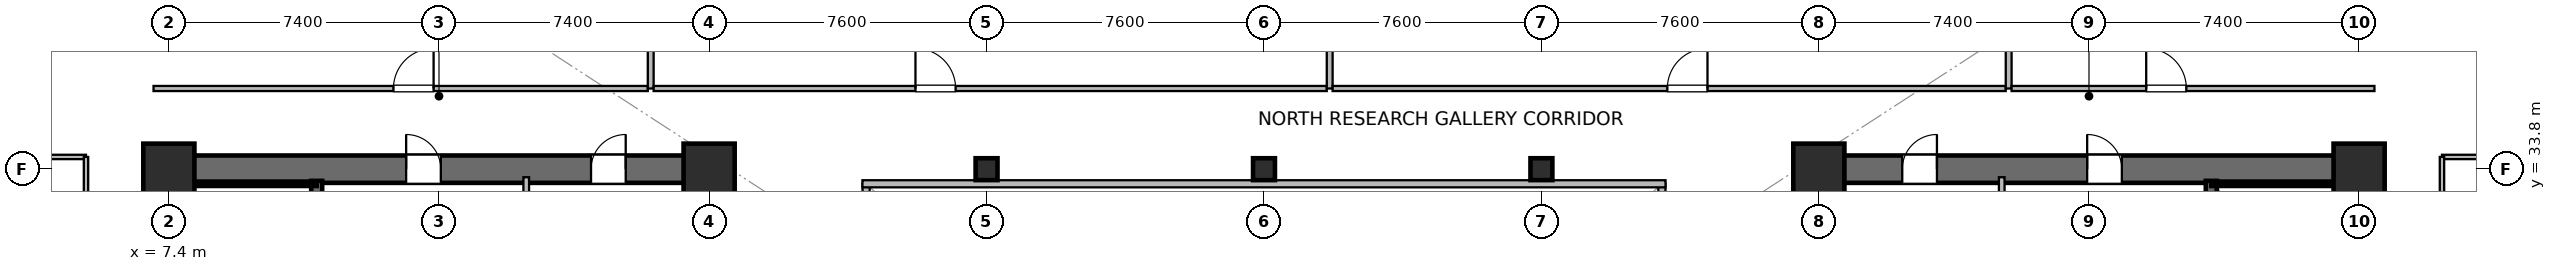
"""IFC4 building model, lengths in metres.
Left out: names, types, materials, properties, quantities, classifications, styles, units other than length and angle.
Written with IfcOpenShell. Run it as: python <this file> out.ifc"""

import sys

from ifc_helpers import new_model, si_unit, direction, frame, frame_2d, origin, origin_2d, place, context, subcontext, project, spatial, rectangle, hollow_rectangle, extrude, source, transform, mapped, element, fill, save


model = new_model("IFC4")
c1 = context("Model", 3, precision=1e-05, world=origin(), true_north=direction((0.0, 1.0)))
c2 = subcontext(c1, "Body", "Model", "MODEL_VIEW")
j1 = project(units=[si_unit("LENGTHUNIT", "METRE"), si_unit("PLANEANGLEUNIT", "RADIAN")], contexts=[c1])
p1 = place(None, origin())
s1 = spatial("IfcSite", under=j1, at=p1, CompositionType="ELEMENT")
p2 = place(p1, origin())
s2 = spatial("IfcBuilding", under=s1, at=p2, CompositionType="ELEMENT")
p3 = place(p2, frame((0.0, 0.0, 25.2)))
s3 = spatial("IfcBuildingStorey", under=s2, at=p3, CompositionType="ELEMENT", Elevation=25.2)
p4 = place(p3, frame((7.025, 33.8, 0.0), z_axis=(0.0, 0.0, 1.0), x_axis=(1.0, 0.0, 0.0)))
e1 = element("IfcWall", 1, at=p4, inside=s3, PredefinedType="SHEAR", context=c2, shape_type="SweptSolid", body=[
    extrude(rectangle(XDim=15.55, YDim=0.75, at=frame_2d((7.775, 0.0))), origin(), (0.0, 0.0, 1.0), 3.78),
])
p5 = place(p4, frame((6.875, 0.0, 0.0)))
e2 = element("IfcOpeningElement", 2, at=p5, cuts=e1, PredefinedType="OPENING", context=c2, shape_type="SweptSolid", body=[
    extrude(rectangle(XDim=0.95, YDim=2.15, at=frame_2d((0.475, 1.075))), frame((0.0, 0.385, 0.0), z_axis=(0.0, -1.0, 0.0), x_axis=(1.0, 0.0, 0.0)), (0.0, 0.0, 1.0), 0.77),
])
p6 = place(p4, frame((11.94, 0.0, 0.0)))
e3 = element("IfcOpeningElement", 3, at=p6, cuts=e1, PredefinedType="OPENING", context=c2, shape_type="SweptSolid", body=[
    extrude(rectangle(XDim=0.95, YDim=2.15, at=frame_2d((0.475, 1.075))), frame((0.0, 0.385, 0.0), z_axis=(0.0, -1.0, 0.0), x_axis=(1.0, 0.0, 0.0)), (0.0, 0.0, 1.0), 0.77),
])
p7 = place(p3, frame((7.4, 15.175, 0.0), z_axis=(0.0, 0.0, 1.0), x_axis=(0.0, 1.0, 0.0)))
e4 = element("IfcWall", 4, at=p7, inside=s3, PredefinedType="SHEAR", context=c2, shape_type="SweptSolid", body=[
    extrude(rectangle(XDim=18.25, YDim=0.75, at=frame_2d((9.125, 0.0))), origin(), (0.0, 0.0, 1.0), 3.78),
])
p8 = place(p3, frame((22.2, 15.175, 0.0), z_axis=(0.0, 0.0, 1.0), x_axis=(0.0, 1.0, 0.0)))
e5 = element("IfcWall", 5, at=p8, inside=s3, PredefinedType="SHEAR", context=c2, shape_type="SweptSolid", body=[
    extrude(rectangle(XDim=18.25, YDim=0.75, at=frame_2d((9.125, 0.0))), origin(), (0.0, 0.0, 1.0), 3.78),
])
p9 = place(p8, frame((3.375, 0.0, 0.0)))
e6 = element("IfcOpeningElement", 6, at=p9, cuts=e5, PredefinedType="OPENING", context=c2, shape_type="SweptSolid", body=[
    extrude(rectangle(XDim=1.42, YDim=2.2, at=frame_2d((0.71, 1.1))), frame((0.0, 0.385, 0.0), z_axis=(0.0, -1.0, 0.0), x_axis=(1.0, 0.0, 0.0)), (0.0, 0.0, 1.0), 0.77),
])
p10 = place(p3, frame((11.45, 24.85, 0.0), z_axis=(0.0, 0.0, 1.0), x_axis=(0.0, 1.0, 0.0)))
e7 = element("IfcWall", 7, at=p10, inside=s3, PredefinedType="SHEAR", context=c2, shape_type="SweptSolid", body=[
    extrude(rectangle(XDim=8.63, YDim=0.3, at=frame_2d((4.315, 0.0))), origin(), (0.0, 0.0, 1.0), 3.78),
])
p11 = place(p10, frame((0.42, 0.0, 0.0)))
e8 = element("IfcOpeningElement", 8, at=p11, cuts=e7, PredefinedType="OPENING", context=c2, shape_type="SweptSolid", body=[
    extrude(rectangle(XDim=1.1, YDim=2.15, at=frame_2d((0.55, 1.075))), frame((0.0, 0.16, 0.0), z_axis=(0.0, -1.0, 0.0), x_axis=(1.0, 0.0, 0.0)), (0.0, 0.0, 1.0), 0.32),
])
p12 = place(p3, frame((7.73, 33.4, 0.0), z_axis=(0.0, 0.0, 1.0), x_axis=(1.0, 0.0, 0.0)))
e9 = element("IfcWall", 9, at=p12, inside=s3, PredefinedType="SOLIDWALL", context=c2, shape_type="SweptSolid", body=[
    extrude(rectangle(XDim=3.72, YDim=0.12, at=frame_2d((1.86, 0.0))), origin(), (0.0, 0.0, 1.0), 3.78),
])
p13 = place(p3, frame((52.225, 33.8, 0.0), z_axis=(0.0, 0.0, 1.0), x_axis=(1.0, 0.0, 0.0)))
e10 = element("IfcWall", 10, at=p13, inside=s3, PredefinedType="SHEAR", context=c2, shape_type="SweptSolid", body=[
    extrude(rectangle(XDim=15.55, YDim=0.75, at=frame_2d((7.775, 0.0))), origin(), (0.0, 0.0, 1.0), 3.78),
])
p14 = place(p13, frame((7.725, 0.0, 0.0)))
e11 = element("IfcOpeningElement", 11, at=p14, cuts=e10, PredefinedType="OPENING", context=c2, shape_type="SweptSolid", body=[
    extrude(rectangle(XDim=0.95, YDim=2.15, at=frame_2d((0.475, 1.075))), frame((0.0, 0.385, 0.0), z_axis=(0.0, -1.0, 0.0), x_axis=(1.0, 0.0, 0.0)), (0.0, 0.0, 1.0), 0.77),
])
p15 = place(p13, frame((2.66, 0.0, 0.0)))
e12 = element("IfcOpeningElement", 12, at=p15, cuts=e10, PredefinedType="OPENING", context=c2, shape_type="SweptSolid", body=[
    extrude(rectangle(XDim=0.95, YDim=2.15, at=frame_2d((0.475, 1.075))), frame((0.0, 0.385, 0.0), z_axis=(0.0, -1.0, 0.0), x_axis=(1.0, 0.0, 0.0)), (0.0, 0.0, 1.0), 0.77),
])
p16 = place(p3, frame((52.6, 15.175, 0.0), z_axis=(0.0, 0.0, 1.0), x_axis=(0.0, 1.0, 0.0)))
e13 = element("IfcWall", 13, at=p16, inside=s3, PredefinedType="SHEAR", context=c2, shape_type="SweptSolid", body=[
    extrude(rectangle(XDim=18.25, YDim=0.75, at=frame_2d((9.125, 0.0))), origin(), (0.0, 0.0, 1.0), 3.78),
])
p17 = place(p16, frame((3.375, 0.0, 0.0)))
e14 = element("IfcOpeningElement", 14, at=p17, cuts=e13, PredefinedType="OPENING", context=c2, shape_type="SweptSolid", body=[
    extrude(rectangle(XDim=1.42, YDim=2.2, at=frame_2d((0.71, 1.1))), frame((0.0, 0.385, 0.0), z_axis=(0.0, -1.0, 0.0), x_axis=(1.0, 0.0, 0.0)), (0.0, 0.0, 1.0), 0.77),
])
p18 = place(p3, frame((67.4, 15.175, 0.0), z_axis=(0.0, 0.0, 1.0), x_axis=(0.0, 1.0, 0.0)))
e15 = element("IfcWall", 15, at=p18, inside=s3, PredefinedType="SHEAR", context=c2, shape_type="SweptSolid", body=[
    extrude(rectangle(XDim=18.25, YDim=0.75, at=frame_2d((9.125, 0.0))), origin(), (0.0, 0.0, 1.0), 3.78),
])
p19 = place(p3, frame((63.35, 24.85, 0.0), z_axis=(0.0, 0.0, 1.0), x_axis=(0.0, 1.0, 0.0)))
e16 = element("IfcWall", 16, at=p19, inside=s3, PredefinedType="SHEAR", context=c2, shape_type="SweptSolid", body=[
    extrude(rectangle(XDim=8.63, YDim=0.3, at=frame_2d((4.315, 0.0))), origin(), (0.0, 0.0, 1.0), 3.78),
])
p20 = place(p19, frame((0.42, 0.0, 0.0)))
e17 = element("IfcOpeningElement", 17, at=p20, cuts=e16, PredefinedType="OPENING", context=c2, shape_type="SweptSolid", body=[
    extrude(rectangle(XDim=1.1, YDim=2.15, at=frame_2d((0.55, 1.075))), frame((0.0, 0.16, 0.0), z_axis=(0.0, -1.0, 0.0), x_axis=(1.0, 0.0, 0.0)), (0.0, 0.0, 1.0), 0.32),
])
p21 = place(p3, frame((63.35, 33.4, 0.0), z_axis=(0.0, 0.0, 1.0), x_axis=(1.0, 0.0, 0.0)))
e18 = element("IfcWall", 18, at=p21, inside=s3, PredefinedType="SOLIDWALL", context=c2, shape_type="SweptSolid", body=[
    extrude(rectangle(XDim=3.72, YDim=0.12, at=frame_2d((1.86, 0.0))), origin(), (0.0, 0.0, 1.0), 3.78),
])
m1 = source(origin(), c2, "Body", "SweptSolid", [
    extrude(rectangle(XDim=1.4, YDim=1.4, at=origin_2d()), origin(), (0.0, 0.0, 1.0), 4.1),
])
for number, where, z_axis, x_axis in (
    (19, (7.4, 33.8, 0.0), (0.0, 0.0, 1.0), (1.0, 0.0, 0.0)),
    (20, (22.2, 33.8, 0.0), (0.0, 0.0, 1.0), (1.0, 0.0, 0.0)),
    (21, (52.6, 33.8, 0.0), (0.0, 0.0, 1.0), (1.0, 0.0, 0.0)),
    (22, (67.4, 33.8, 0.0), (0.0, 0.0, 1.0), (1.0, 0.0, 0.0)),
):
    element("IfcColumn", number, at=place(p3, frame(where, z_axis=z_axis, x_axis=x_axis)), inside=s3, PredefinedType="COLUMN", context=c2, shape_type="MappedRepresentation", body=[
        mapped(m1, transform((0.0, 0.0, 0.0), scale=1.0)),
    ])
m2 = source(origin(), c2, "Body", "SweptSolid", [
    extrude(hollow_rectangle(XDim=0.6, YDim=0.6, WallThickness=0.028, at=origin_2d()), origin(), (0.0, 0.0, 1.0), 4.1),
])
for number, where, z_axis, x_axis in (
    (23, (29.8, 33.8, 0.0), (0.0, 0.0, 1.0), (1.0, 0.0, 0.0)),
    (24, (37.4, 33.8, 0.0), (0.0, 0.0, 1.0), (1.0, 0.0, 0.0)),
    (25, (45.0, 33.8, 0.0), (0.0, 0.0, 1.0), (1.0, 0.0, 0.0)),
):
    element("IfcColumn", number, at=place(p3, frame(where, z_axis=z_axis, x_axis=x_axis)), inside=s3, PredefinedType="COLUMN", context=c2, shape_type="MappedRepresentation", body=[
        mapped(m2, transform((0.0, 0.0, 0.0), scale=1.0)),
    ])
for number, where, z_axis, x_axis in (
    (26, (17.19, 29.65, 0.0), (0.0, 0.0, 1.0), (0.0, 1.0, 0.0)),
    (27, (57.61, 29.65, 0.0), (0.0, 0.0, 1.0), (0.0, 1.0, 0.0)),
):
    element("IfcWall", number, at=place(p3, frame(where, z_axis=z_axis, x_axis=x_axis)), inside=s3, PredefinedType="PLUMBINGWALL", context=c2, shape_type="SweptSolid", body=[
        extrude(rectangle(XDim=3.93, YDim=0.155, at=frame_2d((1.965, 0.0))), origin(), (0.0, 0.0, 1.0), 3.78),
    ])
p22 = place(p3, frame((26.5, 15.2, 0.0), z_axis=(0.0, 0.0, 1.0), x_axis=(0.0, 1.0, 0.0)))
e28 = element("IfcWall", 28, at=p22, inside=s3, PredefinedType="SOLIDWALL", context=c2, shape_type="SweptSolid", body=[
    extrude(rectangle(XDim=18.2, YDim=0.195, at=frame_2d((9.1, 0.0))), origin(), (0.0, 0.0, 1.0), 3.78),
])
p23 = place(p22, frame((1.8, 0.0, 0.9)))
e29 = element("IfcOpeningElement", 29, at=p23, cuts=e28, PredefinedType="OPENING", context=c2, shape_type="SweptSolid", body=[
    extrude(rectangle(XDim=1.5, YDim=1.4, at=frame_2d((0.75, 0.7))), frame((0.0, 0.107, 0.0), z_axis=(0.0, -1.0, 0.0), x_axis=(1.0, 0.0, 0.0)), (0.0, 0.0, 1.0), 0.215),
])
p24 = place(p22, frame((13.2, 0.0, 0.9)))
e30 = element("IfcOpeningElement", 30, at=p24, cuts=e28, PredefinedType="OPENING", context=c2, shape_type="SweptSolid", body=[
    extrude(rectangle(XDim=1.5, YDim=1.4, at=frame_2d((0.75, 0.7))), frame((0.0, 0.107, 0.0), z_axis=(0.0, -1.0, 0.0), x_axis=(1.0, 0.0, 0.0)), (0.0, 0.0, 1.0), 0.215),
])
p25 = place(p3, frame((48.3, 15.2, 0.0), z_axis=(0.0, 0.0, 1.0), x_axis=(0.0, 1.0, 0.0)))
e31 = element("IfcWall", 31, at=p25, inside=s3, PredefinedType="SOLIDWALL", context=c2, shape_type="SweptSolid", body=[
    extrude(rectangle(XDim=18.2, YDim=0.195, at=frame_2d((9.1, 0.0))), origin(), (0.0, 0.0, 1.0), 3.78),
])
p26 = place(p25, frame((1.8, 0.0, 0.9)))
e32 = element("IfcOpeningElement", 32, at=p26, cuts=e31, PredefinedType="OPENING", context=c2, shape_type="SweptSolid", body=[
    extrude(rectangle(XDim=1.5, YDim=1.4, at=frame_2d((0.75, 0.7))), frame((0.0, 0.107, 0.0), z_axis=(0.0, -1.0, 0.0), x_axis=(1.0, 0.0, 0.0)), (0.0, 0.0, 1.0), 0.215),
])
p27 = place(p25, frame((13.2, 0.0, 0.9)))
e33 = element("IfcOpeningElement", 33, at=p27, cuts=e31, PredefinedType="OPENING", context=c2, shape_type="SweptSolid", body=[
    extrude(rectangle(XDim=1.5, YDim=1.4, at=frame_2d((0.75, 0.7))), frame((0.0, 0.107, 0.0), z_axis=(0.0, -1.0, 0.0), x_axis=(1.0, 0.0, 0.0)), (0.0, 0.0, 1.0), 0.215),
])
p28 = place(p3, frame((26.4, 33.4, 0.0), z_axis=(0.0, 0.0, 1.0), x_axis=(1.0, 0.0, 0.0)))
e34 = element("IfcWall", 34, at=p28, inside=s3, PredefinedType="SOLIDWALL", context=c2, shape_type="SweptSolid", body=[
    extrude(rectangle(XDim=22.0, YDim=0.195, at=frame_2d((11.0, 0.0))), origin(), (0.0, 0.0, 1.0), 3.78),
])
p29 = place(p3, frame((6.98, 36.01, 0.0), z_axis=(0.0, 0.0, 1.0), x_axis=(1.0, 0.0, 0.0)))
e35 = element("IfcWall", 35, at=p29, inside=s3, PredefinedType="PARTITIONING", context=c2, shape_type="SweptSolid", body=[
    extrude(rectangle(XDim=13.54, YDim=0.14, at=frame_2d((6.77, 0.0))), origin(), (0.0, 0.0, 1.0), 3.065),
])
p30 = place(p29, frame((6.572, 0.0, 0.0)))
e36 = element("IfcOpeningElement", 36, at=p30, cuts=e35, PredefinedType="OPENING", context=c2, shape_type="SweptSolid", body=[
    extrude(rectangle(XDim=1.1, YDim=2.18, at=frame_2d((0.55, 1.09))), frame((0.0, 0.08, 0.0), z_axis=(0.0, -1.0, 0.0), x_axis=(1.0, 0.0, 0.0)), (0.0, 0.0, 1.0), 0.16),
])
p31 = place(p3, frame((20.6, 36.01, 0.0), z_axis=(0.0, 0.0, 1.0), x_axis=(0.0, 1.0, 0.0)))
e37 = element("IfcWall", 37, at=p31, inside=s3, PredefinedType="PARTITIONING", context=c2, shape_type="SweptSolid", body=[
    extrude(rectangle(XDim=12.48, YDim=0.16, at=frame_2d((6.24, 0.0))), origin(), (0.0, 0.0, 1.0), 3.015),
])
p32 = place(p3, frame((20.68, 36.01, 0.0), z_axis=(0.0, 0.0, 1.0), x_axis=(1.0, 0.0, 0.0)))
e38 = element("IfcWall", 38, at=p32, inside=s3, PredefinedType="PARTITIONING", context=c2, shape_type="SweptSolid", body=[
    extrude(rectangle(XDim=18.44, YDim=0.14, at=frame_2d((9.22, 0.0))), origin(), (0.0, 0.0, 1.0), 3.065),
])
p33 = place(p32, frame((7.172, 0.0, 0.0)))
e39 = element("IfcOpeningElement", 39, at=p33, cuts=e38, PredefinedType="OPENING", context=c2, shape_type="SweptSolid", body=[
    extrude(rectangle(XDim=1.1, YDim=2.18, at=frame_2d((0.55, 1.09))), frame((0.0, 0.08, 0.0), z_axis=(0.0, -1.0, 0.0), x_axis=(1.0, 0.0, 0.0)), (0.0, 0.0, 1.0), 0.16),
])
p34 = place(p3, frame((39.2, 36.01, 0.0), z_axis=(0.0, 0.0, 1.0), x_axis=(0.0, 1.0, 0.0)))
e40 = element("IfcWall", 40, at=p34, inside=s3, PredefinedType="PARTITIONING", context=c2, shape_type="SweptSolid", body=[
    extrude(rectangle(XDim=11.28, YDim=0.16, at=frame_2d((5.64, 0.0))), origin(), (0.0, 0.0, 1.0), 3.015),
])
p35 = place(p3, frame((39.28, 36.01, 0.0), z_axis=(0.0, 0.0, 1.0), x_axis=(1.0, 0.0, 0.0)))
e41 = element("IfcWall", 41, at=p35, inside=s3, PredefinedType="PARTITIONING", context=c2, shape_type="SweptSolid", body=[
    extrude(rectangle(XDim=18.44, YDim=0.14, at=frame_2d((9.22, 0.0))), origin(), (0.0, 0.0, 1.0), 3.065),
])
p36 = place(p35, frame((9.169, 0.0, 0.0)))
e42 = element("IfcOpeningElement", 42, at=p36, cuts=e41, PredefinedType="OPENING", context=c2, shape_type="SweptSolid", body=[
    extrude(rectangle(XDim=1.1, YDim=2.18, at=frame_2d((0.55, 1.09))), frame((0.0, 0.08, 0.0), z_axis=(0.0, -1.0, 0.0), x_axis=(1.0, 0.0, 0.0)), (0.0, 0.0, 1.0), 0.16),
])
p37 = place(p3, frame((57.8, 36.01, 0.0), z_axis=(0.0, 0.0, 1.0), x_axis=(0.0, 1.0, 0.0)))
e43 = element("IfcWall", 43, at=p37, inside=s3, PredefinedType="PARTITIONING", context=c2, shape_type="SweptSolid", body=[
    extrude(rectangle(XDim=12.48, YDim=0.16, at=frame_2d((6.24, 0.0))), origin(), (0.0, 0.0, 1.0), 3.015),
])
p38 = place(p3, frame((57.88, 36.01, 0.0), z_axis=(0.0, 0.0, 1.0), x_axis=(1.0, 0.0, 0.0)))
e44 = element("IfcWall", 44, at=p38, inside=s3, PredefinedType="PARTITIONING", context=c2, shape_type="SweptSolid", body=[
    extrude(rectangle(XDim=9.94, YDim=0.14, at=frame_2d((4.97, 0.0))), origin(), (0.0, 0.0, 1.0), 3.065),
])
p39 = place(p38, frame((3.688, 0.0, 0.0)))
e45 = element("IfcOpeningElement", 45, at=p39, cuts=e44, PredefinedType="OPENING", context=c2, shape_type="SweptSolid", body=[
    extrude(rectangle(XDim=1.1, YDim=2.18, at=frame_2d((0.55, 1.09))), frame((0.0, 0.08, 0.0), z_axis=(0.0, -1.0, 0.0), x_axis=(1.0, 0.0, 0.0)), (0.0, 0.0, 1.0), 0.16),
])
p40 = place(p3, frame((0.11, 34.135, 0.0), z_axis=(0.0, 0.0, 1.0), x_axis=(1.0, 0.0, 0.0)))
e46 = element("IfcWall", 46, at=p40, inside=s3, PredefinedType="PARTITIONING", context=c2, shape_type="SweptSolid", body=[
    extrude(rectangle(XDim=5.02, YDim=0.12, at=frame_2d((2.51, 0.0))), origin(), (0.0, 0.0, 1.0), 3.78),
])
p41 = place(p3, frame((5.13, 22.46, 0.0), z_axis=(0.0, 0.0, 1.0), x_axis=(0.0, 1.0, 0.0)))
e47 = element("IfcWall", 47, at=p41, inside=s3, PredefinedType="PARTITIONING", context=c2, shape_type="SweptSolid", body=[
    extrude(rectangle(XDim=11.675, YDim=0.12, at=frame_2d((5.837, 0.0))), origin(), (0.0, 0.0, 1.0), 3.78),
])
p42 = place(p41, frame((5.387, 0.0, 0.0)))
e48 = element("IfcOpeningElement", 48, at=p42, cuts=e47, PredefinedType="OPENING", context=c2, shape_type="SweptSolid", body=[
    extrude(rectangle(XDim=0.9, YDim=2.1, at=frame_2d((0.45, 1.05))), frame((0.0, 0.07, 0.0), z_axis=(0.0, -1.0, 0.0), x_axis=(1.0, 0.0, 0.0)), (0.0, 0.0, 1.0), 0.14),
])
p43 = place(p3, frame((69.67, 34.135, 0.0), z_axis=(0.0, 0.0, 1.0), x_axis=(1.0, 0.0, 0.0)))
e49 = element("IfcWall", 49, at=p43, inside=s3, PredefinedType="PARTITIONING", context=c2, shape_type="SweptSolid", body=[
    extrude(rectangle(XDim=5.02, YDim=0.12, at=frame_2d((2.51, 0.0))), origin(), (0.0, 0.0, 1.0), 3.78),
])
p44 = place(p3, frame((69.67, 25.86, 0.0), z_axis=(0.0, 0.0, 1.0), x_axis=(0.0, 1.0, 0.0)))
e50 = element("IfcWall", 50, at=p44, inside=s3, PredefinedType="PARTITIONING", context=c2, shape_type="SweptSolid", body=[
    extrude(rectangle(XDim=8.275, YDim=0.12, at=frame_2d((4.137, 0.0))), origin(), (0.0, 0.0, 1.0), 3.78),
])
p45 = place(p44, frame((3.688, 0.0, 0.0)))
e51 = element("IfcOpeningElement", 51, at=p45, cuts=e50, PredefinedType="OPENING", context=c2, shape_type="SweptSolid", body=[
    extrude(rectangle(XDim=0.9, YDim=2.1, at=frame_2d((0.45, 1.05))), frame((0.0, 0.07, 0.0), z_axis=(0.0, -1.0, 0.0), x_axis=(1.0, 0.0, 0.0)), (0.0, 0.0, 1.0), 0.14),
])
m3 = source(origin(), c2, "Body", "SweptSolid", [
    extrude(rectangle(XDim=0.95, YDim=2.15, at=frame_2d((0.475, 1.075))), frame((0.0, 0.025, 0.0), z_axis=(0.0, -1.0, 0.0), x_axis=(1.0, 0.0, 0.0)), (0.0, 0.0, 1.0), 0.05),
])
p46 = place(p5, origin())
e52 = element("IfcDoor", 52, at=p46, inside=s3, OperationType="SINGLE_SWING_LEFT", PredefinedType="DOOR", context=c2, shape_type="MappedRepresentation", body=[
    mapped(m3, transform((0.0, 0.0, 0.0), scale=1.0)),
])
fill(e2, e52)
p47 = place(p6, origin())
e53 = element("IfcDoor", 53, at=p47, inside=s3, OperationType="SINGLE_SWING_RIGHT", PredefinedType="DOOR", context=c2, shape_type="MappedRepresentation", body=[
    mapped(m3, transform((0.0, 0.0, 0.0), scale=1.0)),
])
fill(e3, e53)
p48 = place(p14, origin())
e54 = element("IfcDoor", 54, at=p48, inside=s3, OperationType="SINGLE_SWING_LEFT", PredefinedType="DOOR", context=c2, shape_type="MappedRepresentation", body=[
    mapped(m3, transform((0.0, 0.0, 0.0), scale=1.0)),
])
fill(e11, e54)
p49 = place(p15, origin())
e55 = element("IfcDoor", 55, at=p49, inside=s3, OperationType="SINGLE_SWING_RIGHT", PredefinedType="DOOR", context=c2, shape_type="MappedRepresentation", body=[
    mapped(m3, transform((0.0, 0.0, 0.0), scale=1.0)),
])
fill(e12, e55)
m4 = source(origin(), c2, "Body", "SweptSolid", [
    extrude(rectangle(XDim=1.1, YDim=2.18, at=frame_2d((0.55, 1.09))), frame((0.0, 0.025, 0.0), z_axis=(0.0, -1.0, 0.0), x_axis=(1.0, 0.0, 0.0)), (0.0, 0.0, 1.0), 0.05),
])
p50 = place(p30, origin())
e56 = element("IfcDoor", 56, at=p50, inside=s3, OperationType="SINGLE_SWING_RIGHT", PredefinedType="DOOR", context=c2, shape_type="MappedRepresentation", body=[
    mapped(m4, transform((0.0, 0.0, 0.0), scale=1.0)),
])
fill(e36, e56)
p51 = place(p33, origin())
e57 = element("IfcDoor", 57, at=p51, inside=s3, OperationType="SINGLE_SWING_LEFT", PredefinedType="DOOR", context=c2, shape_type="MappedRepresentation", body=[
    mapped(m4, transform((0.0, 0.0, 0.0), scale=1.0)),
])
fill(e39, e57)
p52 = place(p36, origin())
e58 = element("IfcDoor", 58, at=p52, inside=s3, OperationType="SINGLE_SWING_RIGHT", PredefinedType="DOOR", context=c2, shape_type="MappedRepresentation", body=[
    mapped(m4, transform((0.0, 0.0, 0.0), scale=1.0)),
])
fill(e42, e58)
p53 = place(p39, origin())
e59 = element("IfcDoor", 59, at=p53, inside=s3, OperationType="SINGLE_SWING_LEFT", PredefinedType="DOOR", context=c2, shape_type="MappedRepresentation", body=[
    mapped(m4, transform((0.0, 0.0, 0.0), scale=1.0)),
])
fill(e45, e59)
save(model, sys.argv[1])
